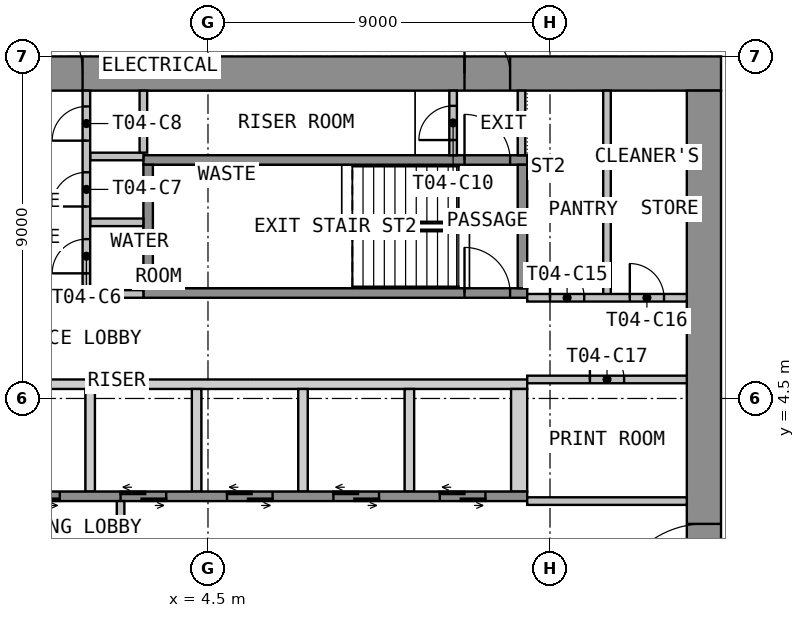
"""IFC4 building model, lengths in metres.
Left out: names, types, materials, properties, quantities, classifications, styles, units other than length and angle.
Written with IfcOpenShell. Run it as: python <this file> out.ifc"""

import sys

from ifc_helpers import new_model, si_unit, direction, frame, frame_2d, origin, place, context, subcontext, project, spatial, polyline, rectangle, outline, extrude, element, fill, save


model = new_model("IFC4")
c1 = context("Model", 3, precision=1e-05, world=origin(), true_north=direction((0.0, 1.0)))
c2 = subcontext(c1, "Body", "Model", "MODEL_VIEW")
j1 = project(units=[si_unit("LENGTHUNIT", "METRE"), si_unit("PLANEANGLEUNIT", "RADIAN")], contexts=[c1])
p1 = place(None, origin())
s1 = spatial("IfcSite", under=j1, at=p1, CompositionType="ELEMENT")
p2 = place(p1, origin())
s2 = spatial("IfcBuilding", under=s1, at=p2, CompositionType="ELEMENT")
p3 = place(p2, frame((0.0, 0.0, 65.1)))
s3 = spatial("IfcBuildingStorey", under=s2, at=p3, CompositionType="ELEMENT", Elevation=65.1)
p4 = place(p3, frame((-18.0, 13.05, 0.0), z_axis=(0.0, 0.0, 1.0), x_axis=(1.0, 0.0, 0.0)))
e1 = element("IfcWall", 1, at=p4, inside=s3, PredefinedType="SHEAR", context=c2, shape_type="SweptSolid", body=[
    extrude(rectangle(XDim=36.0, YDim=0.9, at=frame_2d((18.0, 0.0))), origin(), (0.0, 0.0, 1.0), 3.525),
])
p5 = place(p4, frame((16.8, 0.0, 0.0)))
e2 = element("IfcOpeningElement", 2, at=p5, cuts=e1, PredefinedType="OPENING", context=c2, shape_type="SweptSolid", body=[
    extrude(rectangle(XDim=2.4, YDim=2.1, at=frame_2d((1.2, 1.05))), frame((0.0, 0.46, 0.0), z_axis=(0.0, -1.0, 0.0), x_axis=(1.0, 0.0, 0.0)), (0.0, 0.0, 1.0), 0.92),
])
p6 = place(p4, frame((5.55, 0.0, 0.0)))
e3 = element("IfcOpeningElement", 3, at=p6, cuts=e1, PredefinedType="OPENING", context=c2, shape_type="SweptSolid", body=[
    extrude(rectangle(XDim=1.2, YDim=2.1, at=frame_2d((0.6, 1.05))), frame((0.0, 0.46, 0.0), z_axis=(0.0, -1.0, 0.0), x_axis=(1.0, 0.0, 0.0)), (0.0, 0.0, 1.0), 0.92),
])
p7 = place(p4, frame((29.25, 0.0, 0.0)))
e4 = element("IfcOpeningElement", 4, at=p7, cuts=e1, PredefinedType="OPENING", context=c2, shape_type="SweptSolid", body=[
    extrude(rectangle(XDim=1.2, YDim=2.1, at=frame_2d((0.6, 1.05))), frame((0.0, 0.46, 0.0), z_axis=(0.0, -1.0, 0.0), x_axis=(1.0, 0.0, 0.0)), (0.0, 0.0, 1.0), 0.92),
])
p8 = place(p3, frame((17.55, -12.6, 0.0), z_axis=(0.0, 0.0, 1.0), x_axis=(0.0, 1.0, 0.0)))
e5 = element("IfcWall", 5, at=p8, inside=s3, PredefinedType="SHEAR", context=c2, shape_type="SweptSolid", body=[
    extrude(rectangle(XDim=25.2, YDim=0.9, at=frame_2d((12.6, 0.0))), origin(), (0.0, 0.0, 1.0), 3.525),
])
p9 = place(p8, frame((11.4, 0.0, 0.0)))
e6 = element("IfcOpeningElement", 6, at=p9, cuts=e5, PredefinedType="OPENING", context=c2, shape_type="SweptSolid", body=[
    extrude(rectangle(XDim=2.4, YDim=2.1, at=frame_2d((1.2, 1.05))), frame((0.0, 0.46, 0.0), z_axis=(0.0, -1.0, 0.0), x_axis=(1.0, 0.0, 0.0)), (0.0, 0.0, 1.0), 0.92),
])
p10 = place(p3, origin())
e7 = element("IfcWall", 7, at=p10, inside=s3, PredefinedType="SHEAR", context=c2, shape_type="SweptSolid", body=[
    extrude(outline(polyline([(-12.9, 4.75), (12.9, 4.75), (12.9, 5.0), (-12.9, 5.0), (-12.9, 4.75)])), origin(), (0.0, 0.0, 1.0), 3.525),
])
p11 = place(p3, origin())
e8 = element("IfcWall", 8, at=p11, inside=s3, PredefinedType="SHEAR", context=c2, shape_type="SweptSolid", body=[
    extrude(outline(polyline([(1.275, 2.05), (1.525, 2.05), (1.525, 4.75), (1.275, 4.75), (1.275, 2.05)])), origin(), (0.0, 0.0, 1.0), 3.525),
])
p12 = place(p3, origin())
e9 = element("IfcWall", 9, at=p12, inside=s3, PredefinedType="SHEAR", context=c2, shape_type="SweptSolid", body=[
    extrude(outline(polyline([(4.075, 2.05), (4.325, 2.05), (4.325, 4.75), (4.075, 4.75), (4.075, 2.05)])), origin(), (0.0, 0.0, 1.0), 3.525),
])
p13 = place(p3, origin())
e10 = element("IfcWall", 10, at=p13, inside=s3, PredefinedType="SHEAR", context=c2, shape_type="SweptSolid", body=[
    extrude(outline(polyline([(6.875, 2.05), (7.125, 2.05), (7.125, 4.75), (6.875, 4.75), (6.875, 2.05)])), origin(), (0.0, 0.0, 1.0), 3.525),
])
p14 = place(p3, origin())
e11 = element("IfcWall", 11, at=p14, inside=s3, PredefinedType="SHEAR", context=c2, shape_type="SweptSolid", body=[
    extrude(outline(polyline([(9.675, 2.05), (9.925, 2.05), (9.925, 4.75), (9.675, 4.75), (9.675, 2.05)])), origin(), (0.0, 0.0, 1.0), 3.525),
])
p15 = place(p3, origin())
e12 = element("IfcWall", 12, at=p15, inside=s3, PredefinedType="SHEAR", context=c2, shape_type="SweptSolid", body=[
    extrude(outline(polyline([(12.475, 2.05), (12.9, 2.05), (12.9, 4.75), (12.475, 4.75), (12.475, 2.05)])), origin(), (0.0, 0.0, 1.0), 3.525),
])
p16 = place(p3, frame((-12.9, 1.925, 0.0), z_axis=(0.0, 0.0, 1.0), x_axis=(1.0, 0.0, 0.0)))
e13 = element("IfcWall", 13, at=p16, inside=s3, PredefinedType="SHEAR", context=c2, shape_type="SweptSolid", body=[
    extrude(rectangle(XDim=25.8, YDim=0.25, at=frame_2d((12.9, 0.0))), origin(), (0.0, 0.0, 1.0), 3.525),
])
p17 = place(p16, frame((9.5, 0.0, 0.0)))
e14 = element("IfcOpeningElement", 14, at=p17, cuts=e13, PredefinedType="OPENING", context=c2, shape_type="SweptSolid", body=[
    extrude(rectangle(XDim=1.2, YDim=2.1, at=frame_2d((0.6, 1.05))), frame((0.0, 0.135, 0.0), z_axis=(0.0, -1.0, 0.0), x_axis=(1.0, 0.0, 0.0)), (0.0, 0.0, 1.0), 0.27),
])
p18 = place(p16, frame((12.3, 0.0, 0.0)))
e15 = element("IfcOpeningElement", 15, at=p18, cuts=e13, PredefinedType="OPENING", context=c2, shape_type="SweptSolid", body=[
    extrude(rectangle(XDim=1.2, YDim=2.1, at=frame_2d((0.6, 1.05))), frame((0.0, 0.135, 0.0), z_axis=(0.0, -1.0, 0.0), x_axis=(1.0, 0.0, 0.0)), (0.0, 0.0, 1.0), 0.27),
])
p19 = place(p16, frame((15.1, 0.0, 0.0)))
e16 = element("IfcOpeningElement", 16, at=p19, cuts=e13, PredefinedType="OPENING", context=c2, shape_type="SweptSolid", body=[
    extrude(rectangle(XDim=1.2, YDim=2.1, at=frame_2d((0.6, 1.05))), frame((0.0, 0.135, 0.0), z_axis=(0.0, -1.0, 0.0), x_axis=(1.0, 0.0, 0.0)), (0.0, 0.0, 1.0), 0.27),
])
p20 = place(p16, frame((17.9, 0.0, 0.0)))
e17 = element("IfcOpeningElement", 17, at=p20, cuts=e13, PredefinedType="OPENING", context=c2, shape_type="SweptSolid", body=[
    extrude(rectangle(XDim=1.2, YDim=2.1, at=frame_2d((0.6, 1.05))), frame((0.0, 0.135, 0.0), z_axis=(0.0, -1.0, 0.0), x_axis=(1.0, 0.0, 0.0)), (0.0, 0.0, 1.0), 0.27),
])
p21 = place(p16, frame((20.7, 0.0, 0.0)))
e18 = element("IfcOpeningElement", 18, at=p21, cuts=e13, PredefinedType="OPENING", context=c2, shape_type="SweptSolid", body=[
    extrude(rectangle(XDim=1.2, YDim=2.1, at=frame_2d((0.6, 1.05))), frame((0.0, 0.135, 0.0), z_axis=(0.0, -1.0, 0.0), x_axis=(1.0, 0.0, 0.0)), (0.0, 0.0, 1.0), 0.27),
])
p22 = place(p16, frame((23.5, 0.0, 0.0)))
e19 = element("IfcOpeningElement", 19, at=p22, cuts=e13, PredefinedType="OPENING", context=c2, shape_type="SweptSolid", body=[
    extrude(rectangle(XDim=1.2, YDim=2.1, at=frame_2d((0.6, 1.05))), frame((0.0, 0.135, 0.0), z_axis=(0.0, -1.0, 0.0), x_axis=(1.0, 0.0, 0.0)), (0.0, 0.0, 1.0), 0.27),
])
p23 = place(p3, frame((2.2, -1.8, 0.0), z_axis=(0.0, 0.0, 1.0), x_axis=(0.0, 1.0, 0.0)))
e20 = element("IfcWall", 20, at=p23, inside=s3, PredefinedType="PARTITIONING", context=c2, shape_type="SweptSolid", body=[
    extrude(rectangle(XDim=3.6, YDim=0.2, at=frame_2d((1.8, 0.0))), origin(), (0.0, 0.0, 1.0), 3.525),
])
p24 = place(p23, frame((1.2, 0.0, 0.0)))
e21 = element("IfcOpeningElement", 21, at=p24, cuts=e20, PredefinedType="OPENING", context=c2, shape_type="SweptSolid", body=[
    extrude(rectangle(XDim=1.2, YDim=2.1, at=frame_2d((0.6, 1.05))), frame((0.0, 0.11, 0.0), z_axis=(0.0, -1.0, 0.0), x_axis=(1.0, 0.0, 0.0)), (0.0, 0.0, 1.0), 0.22),
])
p25 = place(p3, frame((2.8, 7.275, 0.0), z_axis=(0.0, 0.0, 1.0), x_axis=(1.0, 0.0, 0.0)))
e22 = element("IfcWall", 22, at=p25, inside=s3, PredefinedType="SHEAR", context=c2, shape_type="SweptSolid", body=[
    extrude(rectangle(XDim=10.1, YDim=0.25, at=frame_2d((5.05, 0.0))), origin(), (0.0, 0.0, 1.0), 3.525),
])
p26 = place(p25, frame((8.45, 0.0, 0.0)))
e23 = element("IfcOpeningElement", 23, at=p26, cuts=e22, PredefinedType="OPENING", context=c2, shape_type="SweptSolid", body=[
    extrude(rectangle(XDim=1.2, YDim=2.1, at=frame_2d((0.6, 1.05))), frame((0.0, 0.135, 0.0), z_axis=(0.0, -1.0, 0.0), x_axis=(1.0, 0.0, 0.0)), (0.0, 0.0, 1.0), 0.27),
])
p27 = place(p3, frame((2.8, 10.775, 0.0), z_axis=(0.0, 0.0, 1.0), x_axis=(1.0, 0.0, 0.0)))
e24 = element("IfcWall", 24, at=p27, inside=s3, PredefinedType="SHEAR", context=c2, shape_type="SweptSolid", body=[
    extrude(rectangle(XDim=10.1, YDim=0.25, at=frame_2d((5.05, 0.0))), origin(), (0.0, 0.0, 1.0), 3.525),
])
p28 = place(p27, frame((8.45, 0.0, 0.0)))
e25 = element("IfcOpeningElement", 25, at=p28, cuts=e24, PredefinedType="OPENING", context=c2, shape_type="SweptSolid", body=[
    extrude(rectangle(XDim=1.2, YDim=2.1, at=frame_2d((0.6, 1.05))), frame((0.0, 0.135, 0.0), z_axis=(0.0, -1.0, 0.0), x_axis=(1.0, 0.0, 0.0)), (0.0, 0.0, 1.0), 0.27),
])
for number, where, z_axis, x_axis in (
    (26, (2.925, 7.4, 0.0), (0.0, 0.0, 1.0), (0.0, 1.0, 0.0)),
    (27, (12.775, 7.4, 0.0), (0.0, 0.0, 1.0), (0.0, 1.0, 0.0)),
):
    element("IfcWall", number, at=place(p3, frame(where, z_axis=z_axis, x_axis=x_axis)), inside=s3, PredefinedType="SHEAR", context=c2, shape_type="SweptSolid", body=[
        extrude(rectangle(XDim=3.25, YDim=0.25, at=frame_2d((1.625, 0.0))), origin(), (0.0, 0.0, 1.0), 3.525),
    ])
for number, where, z_axis, x_axis in (
    (28, (1.4, 7.25, 0.0), (0.0, 0.0, 1.0), (1.0, 0.0, 0.0)),
    (29, (1.4, 9.135, 0.0), (0.0, 0.0, 1.0), (1.0, 0.0, 0.0)),
    (30, (1.4, 10.867, 0.0), (0.0, 0.0, 1.0), (1.0, 0.0, 0.0)),
):
    element("IfcWall", number, at=place(p3, frame(where, z_axis=z_axis, x_axis=x_axis)), inside=s3, PredefinedType="PARTITIONING", context=c2, shape_type="SweptSolid", body=[
        extrude(rectangle(XDim=1.4, YDim=0.2, at=frame_2d((0.7, 0.0))), origin(), (0.0, 0.0, 1.0), 3.525),
    ])
p29 = place(p3, frame((1.3, 7.15, 0.0), z_axis=(0.0, 0.0, 1.0), x_axis=(0.0, 1.0, 0.0)))
e31 = element("IfcWall", 31, at=p29, inside=s3, PredefinedType="PARTITIONING", context=c2, shape_type="SweptSolid", body=[
    extrude(rectangle(XDim=5.45, YDim=0.2, at=frame_2d((2.725, 0.0))), origin(), (0.0, 0.0, 1.0), 3.525),
])
p30 = place(p29, frame((0.643, 0.0, 0.0)))
e32 = element("IfcOpeningElement", 32, at=p30, cuts=e31, PredefinedType="OPENING", context=c2, shape_type="SweptSolid", body=[
    extrude(rectangle(XDim=0.9, YDim=2.1, at=frame_2d((0.45, 1.05))), frame((0.0, 0.11, 0.0), z_axis=(0.0, -1.0, 0.0), x_axis=(1.0, 0.0, 0.0)), (0.0, 0.0, 1.0), 0.22),
])
p31 = place(p29, frame((2.401, 0.0, 0.0)))
e33 = element("IfcOpeningElement", 33, at=p31, cuts=e31, PredefinedType="OPENING", context=c2, shape_type="SweptSolid", body=[
    extrude(rectangle(XDim=0.9, YDim=2.1, at=frame_2d((0.45, 1.05))), frame((0.0, 0.11, 0.0), z_axis=(0.0, -1.0, 0.0), x_axis=(1.0, 0.0, 0.0)), (0.0, 0.0, 1.0), 0.22),
])
p32 = place(p29, frame((4.134, 0.0, 0.0)))
e34 = element("IfcOpeningElement", 34, at=p32, cuts=e31, PredefinedType="OPENING", context=c2, shape_type="SweptSolid", body=[
    extrude(rectangle(XDim=0.9, YDim=2.1, at=frame_2d((0.45, 1.05))), frame((0.0, 0.11, 0.0), z_axis=(0.0, -1.0, 0.0), x_axis=(1.0, 0.0, 0.0)), (0.0, 0.0, 1.0), 0.22),
])
p33 = place(p3, frame((12.75, 10.9, 0.0), z_axis=(0.0, 0.0, 1.0), x_axis=(0.0, 1.0, 0.0)))
e35 = element("IfcWall", 35, at=p33, inside=s3, PredefinedType="PARTITIONING", context=c2, shape_type="SweptSolid", body=[
    extrude(rectangle(XDim=1.7, YDim=0.2, at=frame_2d((0.85, 0.0))), origin(), (0.0, 0.0, 1.0), 3.525),
])
p34 = place(p3, frame((10.95, 10.9, 0.0), z_axis=(0.0, 0.0, 1.0), x_axis=(0.0, 1.0, 0.0)))
e36 = element("IfcWall", 36, at=p34, inside=s3, PredefinedType="PARTITIONING", context=c2, shape_type="SweptSolid", body=[
    extrude(rectangle(XDim=1.7, YDim=0.2, at=frame_2d((0.85, 0.0))), origin(), (0.0, 0.0, 1.0), 3.525),
])
p35 = place(p34, frame((0.4, 0.0, 0.0)))
e37 = element("IfcOpeningElement", 37, at=p35, cuts=e36, PredefinedType="OPENING", context=c2, shape_type="SweptSolid", body=[
    extrude(rectangle(XDim=0.9, YDim=2.1, at=frame_2d((0.45, 1.05))), frame((0.0, 0.11, 0.0), z_axis=(0.0, -1.0, 0.0), x_axis=(1.0, 0.0, 0.0)), (0.0, 0.0, 1.0), 0.22),
])
p36 = place(p3, frame((15.0, 7.15, 0.0), z_axis=(0.0, 0.0, 1.0), x_axis=(0.0, 1.0, 0.0)))
e38 = element("IfcWall", 38, at=p36, inside=s3, PredefinedType="PARTITIONING", context=c2, shape_type="SweptSolid", body=[
    extrude(rectangle(XDim=5.45, YDim=0.2, at=frame_2d((2.725, 0.0))), origin(), (0.0, 0.0, 1.0), 3.525),
])
p37 = place(p3, frame((12.9, 7.15, 0.0), z_axis=(0.0, 0.0, 1.0), x_axis=(1.0, 0.0, 0.0)))
e39 = element("IfcWall", 39, at=p37, inside=s3, PredefinedType="PARTITIONING", context=c2, shape_type="SweptSolid", body=[
    extrude(rectangle(XDim=4.2, YDim=0.2, at=frame_2d((2.1, 0.0))), origin(), (0.0, 0.0, 1.0), 3.525),
])
p38 = place(p37, frame((0.6, 0.0, 0.0)))
e40 = element("IfcOpeningElement", 40, at=p38, cuts=e39, PredefinedType="OPENING", context=c2, shape_type="SweptSolid", body=[
    extrude(rectangle(XDim=0.9, YDim=2.1, at=frame_2d((0.45, 1.05))), frame((0.0, 0.11, 0.0), z_axis=(0.0, -1.0, 0.0), x_axis=(1.0, 0.0, 0.0)), (0.0, 0.0, 1.0), 0.22),
])
p39 = place(p37, frame((2.7, 0.0, 0.0)))
e41 = element("IfcOpeningElement", 41, at=p39, cuts=e39, PredefinedType="OPENING", context=c2, shape_type="SweptSolid", body=[
    extrude(rectangle(XDim=0.9, YDim=2.1, at=frame_2d((0.45, 1.05))), frame((0.0, 0.11, 0.0), z_axis=(0.0, -1.0, 0.0), x_axis=(1.0, 0.0, 0.0)), (0.0, 0.0, 1.0), 0.22),
])
p40 = place(p3, frame((12.9, 5.0, 0.0), z_axis=(0.0, 0.0, 1.0), x_axis=(1.0, 0.0, 0.0)))
e42 = element("IfcWall", 42, at=p40, inside=s3, PredefinedType="PARTITIONING", context=c2, shape_type="SweptSolid", body=[
    extrude(rectangle(XDim=4.2, YDim=0.2, at=frame_2d((2.1, 0.0))), origin(), (0.0, 0.0, 1.0), 3.525),
])
p41 = place(p40, frame((1.65, 0.0, 0.0)))
e43 = element("IfcOpeningElement", 43, at=p41, cuts=e42, PredefinedType="OPENING", context=c2, shape_type="SweptSolid", body=[
    extrude(rectangle(XDim=0.9, YDim=2.1, at=frame_2d((0.45, 1.05))), frame((0.0, 0.11, 0.0), z_axis=(0.0, -1.0, 0.0), x_axis=(1.0, 0.0, 0.0)), (0.0, 0.0, 1.0), 0.22),
])
p42 = place(p3, frame((12.9, 1.8, 0.0), z_axis=(0.0, 0.0, 1.0), x_axis=(1.0, 0.0, 0.0)))
e44 = element("IfcWall", 44, at=p42, inside=s3, PredefinedType="PARTITIONING", context=c2, shape_type="SweptSolid", body=[
    extrude(rectangle(XDim=4.2, YDim=0.2, at=frame_2d((2.1, 0.0))), origin(), (0.0, 0.0, 1.0), 3.525),
])
p43 = place(p3, frame((2.8, 10.969, 0.0), z_axis=(0.0, 0.0, 1.0), x_axis=(0.0, 1.0, 0.0)))
e45 = element("IfcWall", 45, at=p43, inside=s3, PredefinedType="PARTITIONING", context=c2, shape_type="SweptSolid", body=[
    extrude(rectangle(XDim=1.631, YDim=0.2, at=frame_2d((0.815, 0.0))), origin(), (0.0, 0.0, 1.0), 3.525),
])
p44 = place(p9, origin())
e46 = element("IfcDoor", 46, at=p44, inside=s3, OperationType="DOUBLE_DOOR_DOUBLE_SWING", PredefinedType="DOOR", context=c2, shape_type="SweptSolid", body=[
    extrude(rectangle(XDim=2.4, YDim=2.1, at=frame_2d((1.2, 1.05))), frame((0.0, 0.025, 0.0), z_axis=(0.0, -1.0, 0.0), x_axis=(1.0, 0.0, 0.0)), (0.0, 0.0, 1.0), 0.05),
])
fill(e6, e46)
p45 = place(p5, origin())
e47 = element("IfcDoor", 47, at=p45, inside=s3, OperationType="DOUBLE_DOOR_DOUBLE_SWING", PredefinedType="DOOR", context=c2, shape_type="SweptSolid", body=[
    extrude(rectangle(XDim=2.4, YDim=2.1, at=frame_2d((1.2, 1.05))), frame((0.0, 0.025, 0.0), z_axis=(0.0, -1.0, 0.0), x_axis=(1.0, 0.0, 0.0)), (0.0, 0.0, 1.0), 0.05),
])
fill(e2, e47)
p46 = place(p7, origin())
e48 = element("IfcDoor", 48, at=p46, inside=s3, OperationType="SINGLE_SWING_RIGHT", PredefinedType="DOOR", context=c2, shape_type="SweptSolid", body=[
    extrude(rectangle(XDim=1.2, YDim=2.1, at=frame_2d((0.6, 1.05))), frame((0.0, 0.025, 0.0), z_axis=(0.0, -1.0, 0.0), x_axis=(1.0, 0.0, 0.0)), (0.0, 0.0, 1.0), 0.05),
])
fill(e4, e48)
p47 = place(p18, origin())
e49 = element("IfcDoor", 49, at=p47, inside=s3, OperationType="DOUBLE_DOOR_SLIDING", PredefinedType="DOOR", context=c2, shape_type="SweptSolid", body=[
    extrude(rectangle(XDim=1.2, YDim=2.1, at=frame_2d((0.6, 1.05))), frame((0.0, 0.025, 0.0), z_axis=(0.0, -1.0, 0.0), x_axis=(1.0, 0.0, 0.0)), (0.0, 0.0, 1.0), 0.05),
])
fill(e15, e49)
p48 = place(p19, origin())
e50 = element("IfcDoor", 50, at=p48, inside=s3, OperationType="DOUBLE_DOOR_SLIDING", PredefinedType="DOOR", context=c2, shape_type="SweptSolid", body=[
    extrude(rectangle(XDim=1.2, YDim=2.1, at=frame_2d((0.6, 1.05))), frame((0.0, 0.025, 0.0), z_axis=(0.0, -1.0, 0.0), x_axis=(1.0, 0.0, 0.0)), (0.0, 0.0, 1.0), 0.05),
])
fill(e16, e50)
p49 = place(p20, origin())
e51 = element("IfcDoor", 51, at=p49, inside=s3, OperationType="DOUBLE_DOOR_SLIDING", PredefinedType="DOOR", context=c2, shape_type="SweptSolid", body=[
    extrude(rectangle(XDim=1.2, YDim=2.1, at=frame_2d((0.6, 1.05))), frame((0.0, 0.025, 0.0), z_axis=(0.0, -1.0, 0.0), x_axis=(1.0, 0.0, 0.0)), (0.0, 0.0, 1.0), 0.05),
])
fill(e17, e51)
p50 = place(p21, origin())
e52 = element("IfcDoor", 52, at=p50, inside=s3, OperationType="DOUBLE_DOOR_SLIDING", PredefinedType="DOOR", context=c2, shape_type="SweptSolid", body=[
    extrude(rectangle(XDim=1.2, YDim=2.1, at=frame_2d((0.6, 1.05))), frame((0.0, 0.025, 0.0), z_axis=(0.0, -1.0, 0.0), x_axis=(1.0, 0.0, 0.0)), (0.0, 0.0, 1.0), 0.05),
])
fill(e18, e52)
p51 = place(p22, origin())
e53 = element("IfcDoor", 53, at=p51, inside=s3, OperationType="DOUBLE_DOOR_SLIDING", PredefinedType="DOOR", context=c2, shape_type="SweptSolid", body=[
    extrude(rectangle(XDim=1.2, YDim=2.1, at=frame_2d((0.6, 1.05))), frame((0.0, 0.025, 0.0), z_axis=(0.0, -1.0, 0.0), x_axis=(1.0, 0.0, 0.0)), (0.0, 0.0, 1.0), 0.05),
])
fill(e19, e53)
p52 = place(p26, origin())
e54 = element("IfcDoor", 54, at=p52, inside=s3, OperationType="SINGLE_SWING_LEFT", PredefinedType="DOOR", context=c2, shape_type="SweptSolid", body=[
    extrude(rectangle(XDim=1.2, YDim=2.1, at=frame_2d((0.6, 1.05))), frame((0.0, 0.025, 0.0), z_axis=(0.0, -1.0, 0.0), x_axis=(1.0, 0.0, 0.0)), (0.0, 0.0, 1.0), 0.05),
])
fill(e23, e54)
p53 = place(p30, origin())
e55 = element("IfcDoor", 55, at=p53, inside=s3, OperationType="SINGLE_SWING_LEFT", PredefinedType="DOOR", context=c2, shape_type="SweptSolid", body=[
    extrude(rectangle(XDim=0.9, YDim=2.1, at=frame_2d((0.45, 1.05))), frame((0.0, 0.025, 0.0), z_axis=(0.0, -1.0, 0.0), x_axis=(1.0, 0.0, 0.0)), (0.0, 0.0, 1.0), 0.05),
])
fill(e32, e55)
p54 = place(p31, origin())
e56 = element("IfcDoor", 56, at=p54, inside=s3, OperationType="SINGLE_SWING_LEFT", PredefinedType="DOOR", context=c2, shape_type="SweptSolid", body=[
    extrude(rectangle(XDim=0.9, YDim=2.1, at=frame_2d((0.45, 1.05))), frame((0.0, 0.025, 0.0), z_axis=(0.0, -1.0, 0.0), x_axis=(1.0, 0.0, 0.0)), (0.0, 0.0, 1.0), 0.05),
])
fill(e33, e56)
p55 = place(p32, origin())
e57 = element("IfcDoor", 57, at=p55, inside=s3, OperationType="SINGLE_SWING_LEFT", PredefinedType="DOOR", context=c2, shape_type="SweptSolid", body=[
    extrude(rectangle(XDim=0.9, YDim=2.1, at=frame_2d((0.45, 1.05))), frame((0.0, 0.025, 0.0), z_axis=(0.0, -1.0, 0.0), x_axis=(1.0, 0.0, 0.0)), (0.0, 0.0, 1.0), 0.05),
])
fill(e34, e57)
p56 = place(p28, origin())
e58 = element("IfcDoor", 58, at=p56, inside=s3, OperationType="SINGLE_SWING_RIGHT", PredefinedType="DOOR", context=c2, shape_type="SweptSolid", body=[
    extrude(rectangle(XDim=1.2, YDim=2.1, at=frame_2d((0.6, 1.05))), frame((0.0, 0.025, 0.0), z_axis=(0.0, -1.0, 0.0), x_axis=(1.0, 0.0, 0.0)), (0.0, 0.0, 1.0), 0.05),
])
fill(e25, e58)
p57 = place(p35, origin())
e59 = element("IfcDoor", 59, at=p57, inside=s3, OperationType="SINGLE_SWING_LEFT", PredefinedType="DOOR", context=c2, shape_type="SweptSolid", body=[
    extrude(rectangle(XDim=0.9, YDim=2.1, at=frame_2d((0.45, 1.05))), frame((0.0, 0.025, 0.0), z_axis=(0.0, -1.0, 0.0), x_axis=(1.0, 0.0, 0.0)), (0.0, 0.0, 1.0), 0.05),
])
fill(e37, e59)
p58 = place(p38, origin())
e60 = element("IfcDoor", 60, at=p58, inside=s3, OperationType="SINGLE_SWING_LEFT", PredefinedType="DOOR", context=c2, shape_type="SweptSolid", body=[
    extrude(rectangle(XDim=0.9, YDim=2.1, at=frame_2d((0.45, 1.05))), frame((0.0, 0.025, 0.0), z_axis=(0.0, -1.0, 0.0), x_axis=(1.0, 0.0, 0.0)), (0.0, 0.0, 1.0), 0.05),
])
fill(e40, e60)
p59 = place(p39, origin())
e61 = element("IfcDoor", 61, at=p59, inside=s3, OperationType="SINGLE_SWING_LEFT", PredefinedType="DOOR", context=c2, shape_type="SweptSolid", body=[
    extrude(rectangle(XDim=0.9, YDim=2.1, at=frame_2d((0.45, 1.05))), frame((0.0, 0.025, 0.0), z_axis=(0.0, -1.0, 0.0), x_axis=(1.0, 0.0, 0.0)), (0.0, 0.0, 1.0), 0.05),
])
fill(e41, e61)
p60 = place(p41, origin())
e62 = element("IfcDoor", 62, at=p60, inside=s3, OperationType="SINGLE_SWING_LEFT", PredefinedType="DOOR", context=c2, shape_type="SweptSolid", body=[
    extrude(rectangle(XDim=0.9, YDim=2.1, at=frame_2d((0.45, 1.05))), frame((0.0, 0.025, 0.0), z_axis=(0.0, -1.0, 0.0), x_axis=(1.0, 0.0, 0.0)), (0.0, 0.0, 1.0), 0.05),
])
fill(e43, e62)
save(model, sys.argv[1])
